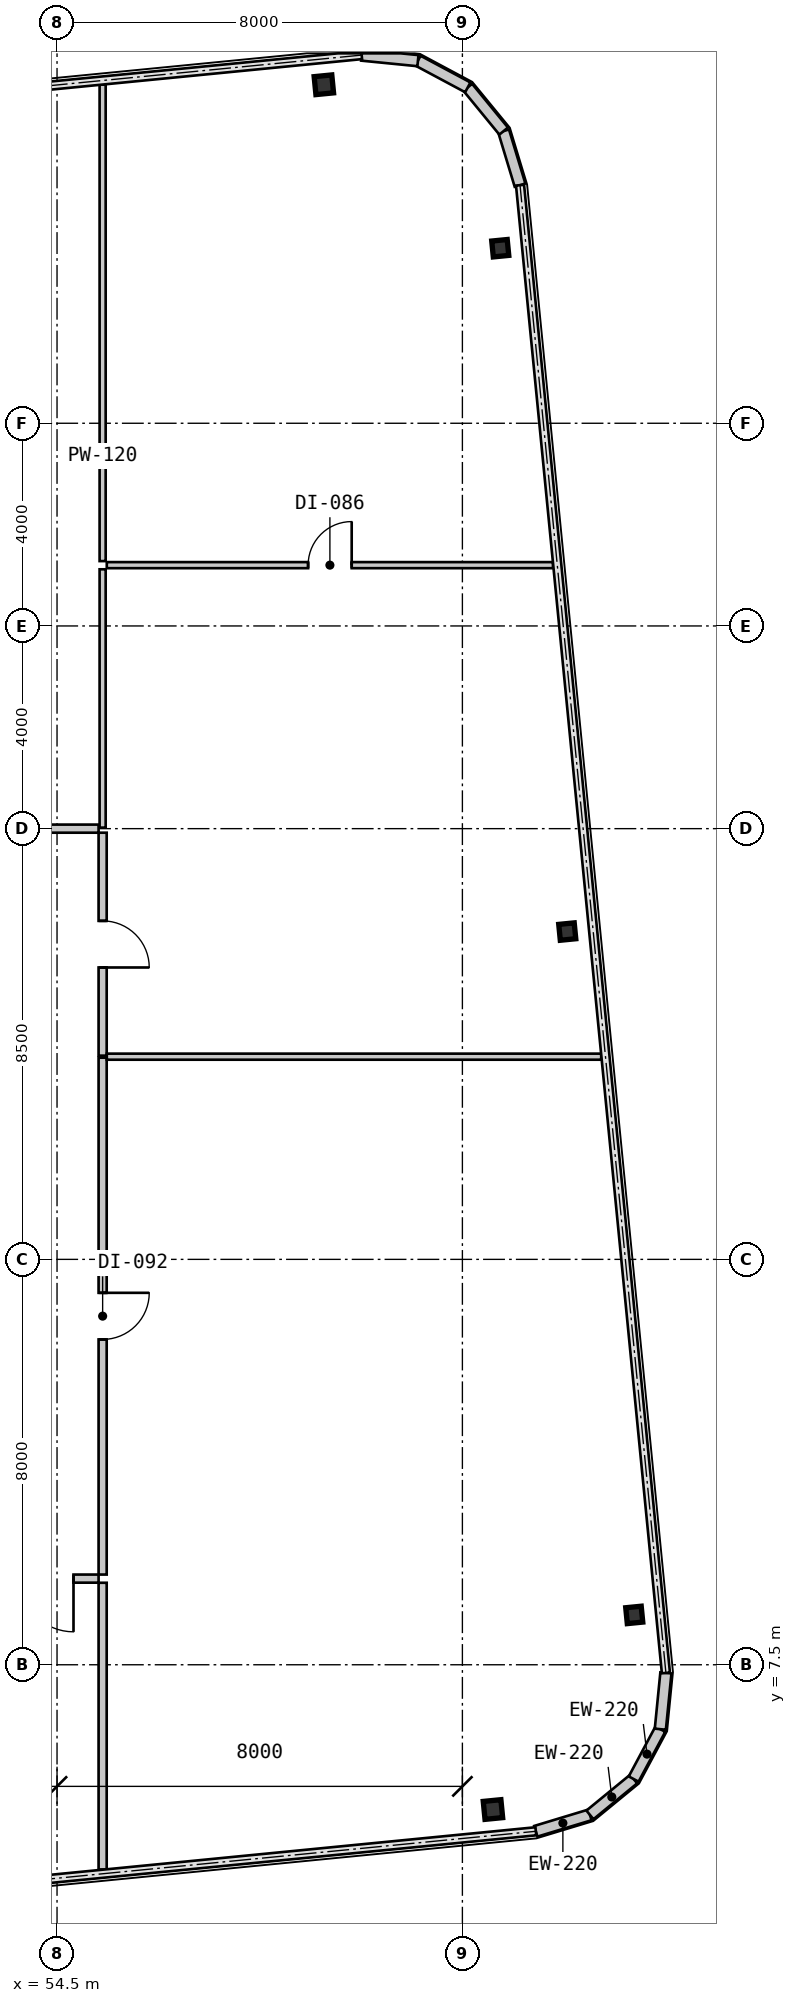
"""IFC4 building model, lengths in metres.
Left out: names, types, materials, properties, quantities, classifications, styles, units other than length and angle.
Written with IfcOpenShell. Run it as: python <this file> out.ifc"""

import sys

from ifc_helpers import new_model, si_unit, direction, frame, frame_2d, origin, origin_2d, place, context, subcontext, project, spatial, rectangle, i_section, extrude, source, transform, mapped, element, fill, save


model = new_model("IFC4")
c1 = context("Model", 3, precision=1e-05, world=origin(), true_north=direction((0.0, 1.0)))
c2 = subcontext(c1, "Body", "Model", "MODEL_VIEW")
j1 = project(units=[si_unit("LENGTHUNIT", "METRE"), si_unit("PLANEANGLEUNIT", "RADIAN")], contexts=[c1])
p1 = place(None, origin())
s1 = spatial("IfcSite", under=j1, at=p1, CompositionType="ELEMENT")
p2 = place(p1, origin())
s2 = spatial("IfcBuilding", under=s1, at=p2, CompositionType="ELEMENT")
p3 = place(p2, frame((0.0, 0.0, 99.75)))
s3 = spatial("IfcBuildingStorey", under=s2, at=p3, CompositionType="ELEMENT", Elevation=99.75)
m1 = source(origin(), c2, "Body", "SweptSolid", [
    extrude(i_section(OverallWidth=0.35, OverallDepth=0.356, WebThickness=0.018, FlangeThickness=0.028, at=origin_2d()), origin(), (0.0, 0.0, 1.0), 3.15),
])
for number, where, z_axis, x_axis in (
    (1, (63.103, 4.643, 0.0), (0.0, 0.0, 1.0), (0.995, 0.098, 0.0)),
    (2, (59.766, 38.68, 0.0), (0.0, 0.0, 1.0), (0.995, 0.098, 0.0)),
):
    element("IfcColumn", number, at=place(p3, frame(where, z_axis=z_axis, x_axis=x_axis)), inside=s3, PredefinedType="COLUMN", context=c2, shape_type="MappedRepresentation", body=[
        mapped(m1, transform((0.0, 0.0, 0.0), scale=1.0)),
    ])
m2 = source(origin(), c2, "Body", "SweptSolid", [
    extrude(i_section(OverallWidth=0.307, OverallDepth=0.315, WebThickness=0.012, FlangeThickness=0.019, at=origin_2d()), origin(), (0.0, 0.0, 1.0), 3.15),
])
for number, where, z_axis, x_axis in (
    (3, (65.892, 8.484, 0.0), (0.0, 0.0, 1.0), (0.995, 0.098, 0.0)),
    (4, (64.57, 21.969, 0.0), (0.0, 0.0, 1.0), (0.995, 0.098, 0.0)),
    (5, (63.247, 35.454, 0.0), (0.0, 0.0, 1.0), (0.995, 0.098, 0.0)),
):
    element("IfcColumn", number, at=place(p3, frame(where, z_axis=z_axis, x_axis=x_axis)), inside=s3, PredefinedType="COLUMN", context=c2, shape_type="MappedRepresentation", body=[
        mapped(m2, transform((0.0, 0.0, 0.0), scale=1.0)),
    ])
m3 = source(origin(), c2, "Body", "SweptSolid", [
    extrude(rectangle(XDim=1.116, YDim=0.22, at=frame_2d((0.558, 0.0))), origin(), (0.0, 0.0, 1.0), 2.93),
])
p4 = place(p3, frame((63.949, 4.214, 0.0), z_axis=(0.0, 0.0, 1.0), x_axis=(0.957052003726, 0.289916301997, 0.0)))
e6 = element("IfcWall", 6, at=p4, inside=s3, PredefinedType="SOLIDWALL", context=c2, shape_type="MappedRepresentation", body=[
    mapped(m3, transform((0.0, 0.0, 0.0), scale=1.0)),
])
m4 = source(origin(), c2, "Body", "SweptSolid", [
    extrude(rectangle(XDim=1.116, YDim=0.22, at=frame_2d((0.558, 0.0))), origin(), (0.0, 0.0, 1.0), 2.93),
])
p5 = place(p3, frame((65.017, 4.537, 0.0), z_axis=(0.0, 0.0, 1.0), x_axis=(0.773342870285, 0.633988016432, 0.0)))
e7 = element("IfcWall", 7, at=p5, inside=s3, PredefinedType="SOLIDWALL", context=c2, shape_type="MappedRepresentation", body=[
    mapped(m4, transform((0.0, 0.0, 0.0), scale=1.0)),
])
p6 = place(p3, frame((65.88, 5.245, 0.0), z_axis=(0.0, 0.0, 1.0), x_axis=(0.471723463201, 0.881746547635, 0.0)))
e8 = element("IfcWall", 8, at=p6, inside=s3, PredefinedType="SOLIDWALL", context=c2, shape_type="MappedRepresentation", body=[
    mapped(m3, transform((0.0, 0.0, 0.0), scale=1.0)),
])
for number, where, z_axis, x_axis in (
    (9, (66.406, 6.229, 0.0), (0.0, 0.0, 1.0), (0.098, 0.995, 0.0)),
    (10, (63.638, 36.698, 0.0), (0.0, 0.0, 1.0), (-0.29, 0.957, 0.0)),
):
    element("IfcWall", number, at=place(p3, frame(where, z_axis=z_axis, x_axis=x_axis)), inside=s3, PredefinedType="SOLIDWALL", context=c2, shape_type="MappedRepresentation", body=[
        mapped(m4, transform((0.0, 0.0, 0.0), scale=1.0)),
    ])
p7 = place(p3, frame((63.314, 37.766, 0.0), z_axis=(0.0, 0.0, 1.0), x_axis=(-0.634095287989, 0.773254916409, 0.0)))
e11 = element("IfcWall", 11, at=p7, inside=s3, PredefinedType="SOLIDWALL", context=c2, shape_type="MappedRepresentation", body=[
    mapped(m3, transform((0.0, 0.0, 0.0), scale=1.0)),
])
for number, where, z_axis, x_axis in (
    (12, (62.607, 38.629, 0.0), (0.0, 0.0, 1.0), (-0.882, 0.472, 0.0)),
    (13, (61.623, 39.156, 0.0), (0.0, 0.0, 1.0), (-0.995, 0.098, 0.0)),
):
    element("IfcWall", number, at=place(p3, frame(where, z_axis=z_axis, x_axis=x_axis)), inside=s3, PredefinedType="SOLIDWALL", context=c2, shape_type="MappedRepresentation", body=[
        mapped(m4, transform((0.0, 0.0, 0.0), scale=1.0)),
    ])
m5 = source(origin(), c2, "Body", "SweptSolid", [
    extrude(rectangle(XDim=2.04, YDim=0.16, at=frame_2d((1.02, 0.0))), origin(), (0.0, 0.0, 1.0), 2.93),
])
p8 = place(p3, frame((55.32, 9.2, 0.0), z_axis=(0.0, 0.0, 1.0), x_axis=(-1.0, 0.0, 0.0)))
e14 = element("IfcWall", 14, at=p8, inside=s3, PredefinedType="PARTITIONING", context=c2, shape_type="MappedRepresentation", body=[
    mapped(m5, transform((0.0, 0.0, 0.0), scale=1.0)),
])
m6 = source(origin(), c2, "Body", "SweptSolid", [
    extrude(rectangle(XDim=1.05, YDim=2.1, at=frame_2d((0.525, 1.05))), frame((0.0, 0.09, 0.0), z_axis=(0.0, -1.0, 0.0), x_axis=(1.0, 0.0, 0.0)), (0.0, 0.0, 1.0), 0.18),
])
p9 = place(p8, frame((0.495, 0.0, 0.0)))
e15 = element("IfcOpeningElement", 15, at=p9, cuts=e14, PredefinedType="OPENING", context=c2, shape_type="MappedRepresentation", body=[
    mapped(m6, transform((0.0, 0.0, 0.0), scale=1.0)),
])
m7 = source(origin(), c2, "Body", "SweptSolid", [
    extrude(rectangle(XDim=10.2, YDim=0.16, at=frame_2d((5.1, 0.0))), origin(), (0.0, 0.0, 1.0), 2.93),
])
p10 = place(p3, frame((55.4, 19.48, 0.0), z_axis=(0.0, 0.0, 1.0), x_axis=(0.0, -1.0, 0.0)))
e16 = element("IfcWall", 16, at=p10, inside=s3, PredefinedType="PARTITIONING", context=c2, shape_type="MappedRepresentation", body=[
    mapped(m7, transform((0.0, 0.0, 0.0), scale=1.0)),
])
m8 = source(origin(), c2, "Body", "SweptSolid", [
    extrude(rectangle(XDim=0.92, YDim=2.1, at=frame_2d((0.46, 1.05))), frame((0.0, 0.09, 0.0), z_axis=(0.0, -1.0, 0.0), x_axis=(1.0, 0.0, 0.0)), (0.0, 0.0, 1.0), 0.18),
])
p11 = place(p10, frame((4.64, 0.0, 0.0)))
e17 = element("IfcOpeningElement", 17, at=p11, cuts=e16, PredefinedType="OPENING", context=c2, shape_type="MappedRepresentation", body=[
    mapped(m8, transform((0.0, 0.0, 0.0), scale=1.0)),
])
m9 = source(origin(), c2, "Body", "SweptSolid", [
    extrude(rectangle(XDim=4.4, YDim=0.16, at=frame_2d((2.2, 0.0))), origin(), (0.0, 0.0, 1.0), 2.93),
])
p12 = place(p3, frame((55.4, 23.92, 0.0), z_axis=(0.0, 0.0, 1.0), x_axis=(0.0, -1.0, 0.0)))
e18 = element("IfcWall", 18, at=p12, inside=s3, PredefinedType="PARTITIONING", context=c2, shape_type="MappedRepresentation", body=[
    mapped(m9, transform((0.0, 0.0, 0.0), scale=1.0)),
])
p13 = place(p12, frame((1.74, 0.0, 0.0)))
e19 = element("IfcOpeningElement", 19, at=p13, cuts=e18, PredefinedType="OPENING", context=c2, shape_type="MappedRepresentation", body=[
    mapped(m8, transform((0.0, 0.0, 0.0), scale=1.0)),
])
m10 = source(origin(), c2, "Body", "SweptSolid", [
    extrude(rectangle(XDim=3.016, YDim=0.16, at=frame_2d((1.508, 0.0))), origin(), (0.0, 0.0, 1.0), 2.93),
])
p14 = place(p3, frame((52.304, 24.0, 0.0), z_axis=(0.0, 0.0, 1.0), x_axis=(1.0, 0.0, 0.0)))
e20 = element("IfcWall", 20, at=p14, inside=s3, PredefinedType="PARTITIONING", context=c2, shape_type="MappedRepresentation", body=[
    mapped(m10, transform((0.0, 0.0, 0.0), scale=1.0)),
])
m11 = source(origin(), c2, "Body", "SweptSolid", [
    extrude(rectangle(XDim=5.658, YDim=0.16, at=frame_2d((2.829, 0.0))), origin(), (0.0, 0.0, 1.0), 2.93),
])
p15 = place(p3, frame((55.4, 9.118, 0.0), z_axis=(0.0, 0.0, 1.0), x_axis=(0.0, -1.0, 0.0)))
e21 = element("IfcWall", 21, at=p15, inside=s3, PredefinedType="PARTITIONING", context=c2, shape_type="MappedRepresentation", body=[
    mapped(m11, transform((0.0, 0.0, 0.0), scale=1.0)),
])
m12 = source(origin(), c2, "Body", "SweptSolid", [
    extrude(rectangle(XDim=9.758, YDim=0.12, at=frame_2d((4.879, 0.0))), origin(), (0.0, 0.0, 1.0), 2.93),
])
p16 = place(p3, frame((55.482, 19.5, 0.0), z_axis=(0.0, 0.0, 1.0), x_axis=(1.0, 0.0, 0.0)))
e22 = element("IfcWall", 22, at=p16, inside=s3, PredefinedType="PARTITIONING", context=c2, shape_type="MappedRepresentation", body=[
    mapped(m12, transform((0.0, 0.0, 0.0), scale=1.0)),
])
m13 = source(origin(), c2, "Body", "SweptSolid", [
    extrude(rectangle(XDim=8.806, YDim=0.12, at=frame_2d((4.403, 0.0))), origin(), (0.0, 0.0, 1.0), 2.93),
])
p17 = place(p3, frame((55.482, 29.2, 0.0), z_axis=(0.0, 0.0, 1.0), x_axis=(1.0, 0.0, 0.0)))
e23 = element("IfcWall", 23, at=p17, inside=s3, PredefinedType="PARTITIONING", context=c2, shape_type="MappedRepresentation", body=[
    mapped(m13, transform((0.0, 0.0, 0.0), scale=1.0)),
])
m14 = source(origin(), c2, "Body", "SweptSolid", [
    extrude(rectangle(XDim=0.86, YDim=2.1, at=frame_2d((0.43, 1.05))), frame((0.0, 0.07, 0.0), z_axis=(0.0, -1.0, 0.0), x_axis=(1.0, 0.0, 0.0)), (0.0, 0.0, 1.0), 0.14),
])
p18 = place(p17, frame((3.973, 0.0, 0.0)))
e24 = element("IfcOpeningElement", 24, at=p18, cuts=e23, PredefinedType="OPENING", context=c2, shape_type="MappedRepresentation", body=[
    mapped(m14, transform((0.0, 0.0, 0.0), scale=1.0)),
])
m15 = source(origin(), c2, "Body", "SweptSolid", [
    extrude(rectangle(XDim=5.098, YDim=0.12, at=frame_2d((2.549, 0.0))), origin(), (0.0, 0.0, 1.0), 2.93),
])
p19 = place(p3, frame((55.4, 24.02, 0.0), z_axis=(0.0, 0.0, 1.0), x_axis=(0.0, 1.0, 0.0)))
e25 = element("IfcWall", 25, at=p19, inside=s3, PredefinedType="PARTITIONING", context=c2, shape_type="MappedRepresentation", body=[
    mapped(m15, transform((0.0, 0.0, 0.0), scale=1.0)),
])
m16 = source(origin(), c2, "Body", "SweptSolid", [
    extrude(rectangle(XDim=9.402, YDim=0.12, at=frame_2d((4.701, 0.0))), origin(), (0.0, 0.0, 1.0), 2.93),
])
p20 = place(p3, frame((55.4, 29.28, 0.0), z_axis=(0.0, 0.0, 1.0), x_axis=(0.0, 1.0, 0.0)))
e26 = element("IfcWall", 26, at=p20, inside=s3, PredefinedType="PARTITIONING", context=c2, shape_type="MappedRepresentation", body=[
    mapped(m16, transform((0.0, 0.0, 0.0), scale=1.0)),
])
m17 = source(origin(), c2, "Body", "SweptSolid", [
    extrude(rectangle(XDim=1.05, YDim=2.1, at=frame_2d((0.525, 1.05))), frame((0.0, 0.025, 0.0), z_axis=(0.0, -1.0, 0.0), x_axis=(1.0, 0.0, 0.0)), (0.0, 0.0, 1.0), 0.05),
])
p21 = place(p9, origin())
e27 = element("IfcDoor", 27, at=p21, inside=s3, OperationType="SINGLE_SWING_LEFT", PredefinedType="DOOR", context=c2, shape_type="MappedRepresentation", body=[
    mapped(m17, transform((0.0, 0.0, 0.0), scale=1.0)),
])
fill(e15, e27)
m18 = source(origin(), c2, "Body", "SweptSolid", [
    extrude(rectangle(XDim=0.92, YDim=2.1, at=frame_2d((0.46, 1.05))), frame((0.0, 0.025, 0.0), z_axis=(0.0, -1.0, 0.0), x_axis=(1.0, 0.0, 0.0)), (0.0, 0.0, 1.0), 0.05),
])
p22 = place(p11, origin())
e28 = element("IfcDoor", 28, at=p22, inside=s3, OperationType="SINGLE_SWING_LEFT", PredefinedType="DOOR", context=c2, shape_type="MappedRepresentation", body=[
    mapped(m18, transform((0.0, 0.0, 0.0), scale=1.0)),
])
fill(e17, e28)
p23 = place(p13, origin())
e29 = element("IfcDoor", 29, at=p23, inside=s3, OperationType="SINGLE_SWING_RIGHT", PredefinedType="DOOR", context=c2, shape_type="MappedRepresentation", body=[
    mapped(m18, transform((0.0, 0.0, 0.0), scale=1.0)),
])
fill(e19, e29)
m19 = source(origin(), c2, "Body", "SweptSolid", [
    extrude(rectangle(XDim=0.86, YDim=2.1, at=frame_2d((0.43, 1.05))), frame((0.0, 0.025, 0.0), z_axis=(0.0, -1.0, 0.0), x_axis=(1.0, 0.0, 0.0)), (0.0, 0.0, 1.0), 0.05),
])
p24 = place(p18, origin())
e30 = element("IfcDoor", 30, at=p24, inside=s3, OperationType="SINGLE_SWING_RIGHT", PredefinedType="DOOR", context=c2, shape_type="MappedRepresentation", body=[
    mapped(m19, transform((0.0, 0.0, 0.0), scale=1.0)),
])
fill(e24, e30)
save(model, sys.argv[1])
